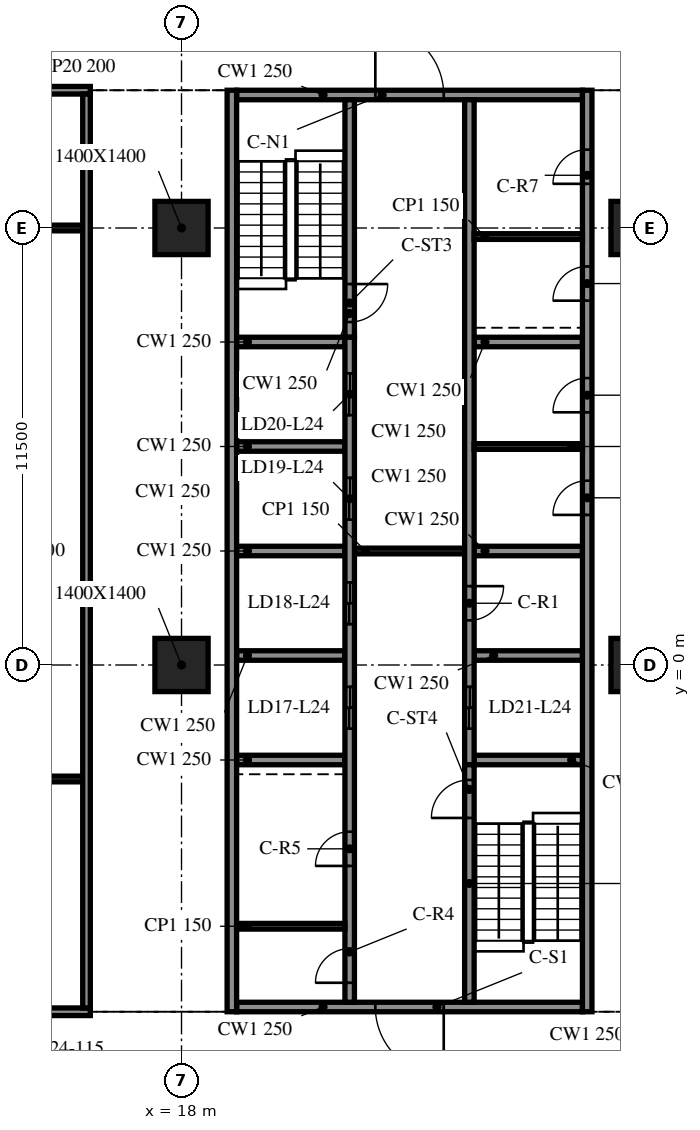
"""IFC4 building model, lengths in metres.
Left out: names, types, materials, properties, quantities, classifications, styles, units other than length and angle.
Written with IfcOpenShell. Run it as: python <this file> out.ifc"""

import sys

from ifc_helpers import new_model, si_unit, direction, frame, frame_2d, origin, origin_2d, place, context, subcontext, project, spatial, rectangle, extrude, element, fill, save


model = new_model("IFC4")
c1 = context("Model", 3, precision=1e-05, world=origin(), true_north=direction((0.0, 1.0)))
c2 = subcontext(c1, "Body", "Model", "MODEL_VIEW")
j1 = project(units=[si_unit("LENGTHUNIT", "METRE"), si_unit("PLANEANGLEUNIT", "RADIAN")], contexts=[c1])
p1 = place(None, origin())
s1 = spatial("IfcSite", under=j1, at=p1, CompositionType="ELEMENT")
p2 = place(p1, origin())
s2 = spatial("IfcBuilding", under=s1, at=p2, CompositionType="ELEMENT")
p3 = place(p2, frame((0.0, 0.0, 105.3)))
s3 = spatial("IfcBuildingStorey", under=s2, at=p3, CompositionType="ELEMENT", Elevation=105.3)
for number, where, z_axis, x_axis in (
    (1, (18.0, 0.0, -0.34), (0.0, 0.0, 1.0), (1.0, 0.0, 0.0)),
    (2, (18.0, 11.5, -0.34), (0.0, 0.0, 1.0), (1.0, 0.0, 0.0)),
    (3, (30.0, 0.0, -0.34), (0.0, 0.0, 1.0), (1.0, 0.0, 0.0)),
    (4, (30.0, 11.5, -0.34), (0.0, 0.0, 1.0), (1.0, 0.0, 0.0)),
):
    element("IfcColumn", number, at=place(p3, frame(where, z_axis=z_axis, x_axis=x_axis)), inside=s3, PredefinedType="COLUMN", context=c2, shape_type="SweptSolid", body=[
        extrude(rectangle(XDim=1.4, YDim=1.4, at=origin_2d()), origin(), (0.0, 0.0, 1.0), 4.1),
    ])
p4 = place(p3, frame((19.325, 15.125, 0.0), z_axis=(0.0, 0.0, 1.0), x_axis=(0.0, -1.0, 0.0)))
e5 = element("IfcWall", 5, at=p4, inside=s3, PredefinedType="SOLIDWALL", context=c2, shape_type="SweptSolid", body=[
    extrude(rectangle(XDim=24.25, YDim=0.25, at=frame_2d((12.125, 0.0))), origin(), (0.0, 0.0, 1.0), 3.76),
])
p5 = place(p3, frame((28.675, -9.125, 0.0), z_axis=(0.0, 0.0, 1.0), x_axis=(0.0, 1.0, 0.0)))
e6 = element("IfcWall", 6, at=p5, inside=s3, PredefinedType="SOLIDWALL", context=c2, shape_type="SweptSolid", body=[
    extrude(rectangle(XDim=24.25, YDim=0.25, at=frame_2d((12.125, 0.0))), origin(), (0.0, 0.0, 1.0), 3.76),
])
p6 = place(p5, frame((13.075, 0.0, 0.0)))
e7 = element("IfcOpeningElement", 7, at=p6, cuts=e6, PredefinedType="OPENING", context=c2, shape_type="SweptSolid", body=[
    extrude(rectangle(XDim=0.9, YDim=2.1, at=frame_2d((0.45, 1.05))), frame((0.0, 0.135, 0.0), z_axis=(0.0, -1.0, 0.0), x_axis=(1.0, 0.0, 0.0)), (0.0, 0.0, 1.0), 0.27),
])
p7 = place(p5, frame((15.775, 0.0, 0.0)))
e8 = element("IfcOpeningElement", 8, at=p7, cuts=e6, PredefinedType="OPENING", context=c2, shape_type="SweptSolid", body=[
    extrude(rectangle(XDim=0.9, YDim=2.1, at=frame_2d((0.45, 1.05))), frame((0.0, 0.135, 0.0), z_axis=(0.0, -1.0, 0.0), x_axis=(1.0, 0.0, 0.0)), (0.0, 0.0, 1.0), 0.27),
])
p8 = place(p5, frame((18.712, 0.0, 0.0)))
e9 = element("IfcOpeningElement", 9, at=p8, cuts=e6, PredefinedType="OPENING", context=c2, shape_type="SweptSolid", body=[
    extrude(rectangle(XDim=0.9, YDim=2.1, at=frame_2d((0.45, 1.05))), frame((0.0, 0.135, 0.0), z_axis=(0.0, -1.0, 0.0), x_axis=(1.0, 0.0, 0.0)), (0.0, 0.0, 1.0), 0.27),
])
p9 = place(p5, frame((21.788, 0.0, 0.0)))
e10 = element("IfcOpeningElement", 10, at=p9, cuts=e6, PredefinedType="OPENING", context=c2, shape_type="SweptSolid", body=[
    extrude(rectangle(XDim=0.9, YDim=2.1, at=frame_2d((0.45, 1.05))), frame((0.0, 0.135, 0.0), z_axis=(0.0, -1.0, 0.0), x_axis=(1.0, 0.0, 0.0)), (0.0, 0.0, 1.0), 0.27),
])
p10 = place(p3, frame((28.55, -9.0, 0.0), z_axis=(0.0, 0.0, 1.0), x_axis=(-1.0, 0.0, 0.0)))
e11 = element("IfcWall", 11, at=p10, inside=s3, PredefinedType="SOLIDWALL", context=c2, shape_type="SweptSolid", body=[
    extrude(rectangle(XDim=9.1, YDim=0.25, at=frame_2d((4.55, 0.0))), origin(), (0.0, 0.0, 1.0), 3.76),
])
p11 = place(p10, frame((3.65, 0.0, 0.0)))
e12 = element("IfcOpeningElement", 12, at=p11, cuts=e11, PredefinedType="OPENING", context=c2, shape_type="SweptSolid", body=[
    extrude(rectangle(XDim=1.8, YDim=2.1, at=frame_2d((0.9, 1.05))), frame((0.0, 0.135, 0.0), z_axis=(0.0, -1.0, 0.0), x_axis=(1.0, 0.0, 0.0)), (0.0, 0.0, 1.0), 0.27),
])
p12 = place(p3, frame((19.45, 15.0, 0.0), z_axis=(0.0, 0.0, 1.0), x_axis=(1.0, 0.0, 0.0)))
e13 = element("IfcWall", 13, at=p12, inside=s3, PredefinedType="SOLIDWALL", context=c2, shape_type="SweptSolid", body=[
    extrude(rectangle(XDim=9.1, YDim=0.25, at=frame_2d((4.55, 0.0))), origin(), (0.0, 0.0, 1.0), 3.76),
])
p13 = place(p12, frame((3.65, 0.0, 0.0)))
e14 = element("IfcOpeningElement", 14, at=p13, cuts=e13, PredefinedType="OPENING", context=c2, shape_type="SweptSolid", body=[
    extrude(rectangle(XDim=1.8, YDim=2.1, at=frame_2d((0.9, 1.05))), frame((0.0, 0.135, 0.0), z_axis=(0.0, -1.0, 0.0), x_axis=(1.0, 0.0, 0.0)), (0.0, 0.0, 1.0), 0.27),
])
p14 = place(p3, frame((22.425, -8.875, 0.0), z_axis=(0.0, 0.0, 1.0), x_axis=(0.0, 1.0, 0.0)))
e15 = element("IfcWall", 15, at=p14, inside=s3, PredefinedType="SOLIDWALL", context=c2, shape_type="SweptSolid", body=[
    extrude(rectangle(XDim=17.5, YDim=0.25, at=frame_2d((8.75, 0.0))), origin(), (0.0, 0.0, 1.0), 3.76),
])
p15 = place(p14, frame((7.2, 0.0, 0.0)))
e16 = element("IfcOpeningElement", 16, at=p15, cuts=e15, PredefinedType="OPENING", context=c2, shape_type="SweptSolid", body=[
    extrude(rectangle(XDim=1.1, YDim=2.1, at=frame_2d((0.55, 1.05))), frame((0.0, 0.135, 0.0), z_axis=(0.0, -1.0, 0.0), x_axis=(1.0, 0.0, 0.0)), (0.0, 0.0, 1.0), 0.27),
])
p16 = place(p14, frame((9.95, 0.0, 0.0)))
e17 = element("IfcOpeningElement", 17, at=p16, cuts=e15, PredefinedType="OPENING", context=c2, shape_type="SweptSolid", body=[
    extrude(rectangle(XDim=1.1, YDim=2.1, at=frame_2d((0.55, 1.05))), frame((0.0, 0.135, 0.0), z_axis=(0.0, -1.0, 0.0), x_axis=(1.0, 0.0, 0.0)), (0.0, 0.0, 1.0), 0.27),
])
p17 = place(p14, frame((12.7, 0.0, 0.0)))
e18 = element("IfcOpeningElement", 18, at=p17, cuts=e15, PredefinedType="OPENING", context=c2, shape_type="SweptSolid", body=[
    extrude(rectangle(XDim=1.1, YDim=2.1, at=frame_2d((0.55, 1.05))), frame((0.0, 0.135, 0.0), z_axis=(0.0, -1.0, 0.0), x_axis=(1.0, 0.0, 0.0)), (0.0, 0.0, 1.0), 0.27),
])
p18 = place(p14, frame((15.45, 0.0, 0.0)))
e19 = element("IfcOpeningElement", 19, at=p18, cuts=e15, PredefinedType="OPENING", context=c2, shape_type="SweptSolid", body=[
    extrude(rectangle(XDim=1.1, YDim=2.1, at=frame_2d((0.55, 1.05))), frame((0.0, 0.135, 0.0), z_axis=(0.0, -1.0, 0.0), x_axis=(1.0, 0.0, 0.0)), (0.0, 0.0, 1.0), 0.27),
])
p19 = place(p14, frame((0.512, 0.0, 0.0)))
e20 = element("IfcOpeningElement", 20, at=p19, cuts=e15, PredefinedType="OPENING", context=c2, shape_type="SweptSolid", body=[
    extrude(rectangle(XDim=0.9, YDim=2.1, at=frame_2d((0.45, 1.05))), frame((0.0, 0.135, 0.0), z_axis=(0.0, -1.0, 0.0), x_axis=(1.0, 0.0, 0.0)), (0.0, 0.0, 1.0), 0.27),
])
p20 = place(p14, frame((3.587, 0.0, 0.0)))
e21 = element("IfcOpeningElement", 21, at=p20, cuts=e15, PredefinedType="OPENING", context=c2, shape_type="SweptSolid", body=[
    extrude(rectangle(XDim=0.9, YDim=2.1, at=frame_2d((0.45, 1.05))), frame((0.0, 0.135, 0.0), z_axis=(0.0, -1.0, 0.0), x_axis=(1.0, 0.0, 0.0)), (0.0, 0.0, 1.0), 0.27),
])
p21 = place(p3, frame((22.425, 14.875, 0.0), z_axis=(0.0, 0.0, 1.0), x_axis=(0.0, -1.0, 0.0)))
e22 = element("IfcWall", 22, at=p21, inside=s3, PredefinedType="SOLIDWALL", context=c2, shape_type="SweptSolid", body=[
    extrude(rectangle(XDim=6.25, YDim=0.25, at=frame_2d((3.125, 0.0))), origin(), (0.0, 0.0, 1.0), 3.76),
])
p22 = place(p21, frame((4.85, 0.0, 0.0)))
e23 = element("IfcOpeningElement", 23, at=p22, cuts=e22, PredefinedType="OPENING", context=c2, shape_type="SweptSolid", body=[
    extrude(rectangle(XDim=1.0, YDim=2.1, at=frame_2d((0.5, 1.05))), frame((0.0, 0.135, 0.0), z_axis=(0.0, -1.0, 0.0), x_axis=(1.0, 0.0, 0.0)), (0.0, 0.0, 1.0), 0.27),
])
p23 = place(p3, frame((25.575, -8.875, 0.0), z_axis=(0.0, 0.0, 1.0), x_axis=(0.0, 1.0, 0.0)))
e24 = element("IfcWall", 24, at=p23, inside=s3, PredefinedType="SOLIDWALL", context=c2, shape_type="SweptSolid", body=[
    extrude(rectangle(XDim=6.25, YDim=0.25, at=frame_2d((3.125, 0.0))), origin(), (0.0, 0.0, 1.0), 3.76),
])
p24 = place(p23, frame((4.85, 0.0, 0.0)))
e25 = element("IfcOpeningElement", 25, at=p24, cuts=e24, PredefinedType="OPENING", context=c2, shape_type="SweptSolid", body=[
    extrude(rectangle(XDim=1.0, YDim=2.1, at=frame_2d((0.5, 1.05))), frame((0.0, 0.135, 0.0), z_axis=(0.0, -1.0, 0.0), x_axis=(1.0, 0.0, 0.0)), (0.0, 0.0, 1.0), 0.27),
])
p25 = place(p3, frame((25.575, 14.875, 0.0), z_axis=(0.0, 0.0, 1.0), x_axis=(0.0, -1.0, 0.0)))
e26 = element("IfcWall", 26, at=p25, inside=s3, PredefinedType="SOLIDWALL", context=c2, shape_type="SweptSolid", body=[
    extrude(rectangle(XDim=17.5, YDim=0.25, at=frame_2d((8.75, 0.0))), origin(), (0.0, 0.0, 1.0), 3.76),
])
p26 = place(p25, frame((15.45, 0.0, 0.0)))
e27 = element("IfcOpeningElement", 27, at=p26, cuts=e26, PredefinedType="OPENING", context=c2, shape_type="SweptSolid", body=[
    extrude(rectangle(XDim=1.1, YDim=2.1, at=frame_2d((0.55, 1.05))), frame((0.0, 0.135, 0.0), z_axis=(0.0, -1.0, 0.0), x_axis=(1.0, 0.0, 0.0)), (0.0, 0.0, 1.0), 0.27),
])
p27 = place(p25, frame((12.8, 0.0, 0.0)))
e28 = element("IfcOpeningElement", 28, at=p27, cuts=e26, PredefinedType="OPENING", context=c2, shape_type="SweptSolid", body=[
    extrude(rectangle(XDim=0.9, YDim=2.1, at=frame_2d((0.45, 1.05))), frame((0.0, 0.135, 0.0), z_axis=(0.0, -1.0, 0.0), x_axis=(1.0, 0.0, 0.0)), (0.0, 0.0, 1.0), 0.27),
])
for number, where, z_axis, x_axis in (
    (29, (19.45, -2.5, 0.0), (0.0, 0.0, 1.0), (1.0, 0.0, 0.0)),
    (30, (19.45, 0.25, 0.0), (0.0, 0.0, 1.0), (1.0, 0.0, 0.0)),
    (31, (19.45, 3.0, 0.0), (0.0, 0.0, 1.0), (1.0, 0.0, 0.0)),
    (32, (19.45, 5.75, 0.0), (0.0, 0.0, 1.0), (1.0, 0.0, 0.0)),
    (33, (19.45, 8.5, 0.0), (0.0, 0.0, 1.0), (1.0, 0.0, 0.0)),
    (34, (25.7, -2.5, 0.0), (0.0, 0.0, 1.0), (1.0, 0.0, 0.0)),
    (35, (25.7, 0.25, 0.0), (0.0, 0.0, 1.0), (1.0, 0.0, 0.0)),
    (36, (25.7, 3.0, 0.0), (0.0, 0.0, 1.0), (1.0, 0.0, 0.0)),
    (37, (25.7, 8.5, 0.0), (0.0, 0.0, 1.0), (1.0, 0.0, 0.0)),
):
    element("IfcWall", number, at=place(p3, frame(where, z_axis=z_axis, x_axis=x_axis)), inside=s3, PredefinedType="SOLIDWALL", context=c2, shape_type="SweptSolid", body=[
        extrude(rectangle(XDim=2.85, YDim=0.25, at=frame_2d((1.425, 0.0))), origin(), (0.0, 0.0, 1.0), 3.76),
    ])
p28 = place(p3, frame((22.55, 3.0, 0.0), z_axis=(0.0, 0.0, 1.0), x_axis=(1.0, 0.0, 0.0)))
e38 = element("IfcWall", 38, at=p28, inside=s3, PredefinedType="PARTITIONING", context=c2, shape_type="SweptSolid", body=[
    extrude(rectangle(XDim=2.9, YDim=0.15, at=frame_2d((1.45, 0.0))), origin(), (0.0, 0.0, 1.0), 3.76),
])
for number, where, z_axis, x_axis in (
    (39, (25.7, 5.75, 0.0), (0.0, 0.0, 1.0), (1.0, 0.0, 0.0)),
    (40, (19.45, -6.875, 0.0), (0.0, 0.0, 1.0), (1.0, 0.0, 0.0)),
    (41, (25.7, 11.275, 0.0), (0.0, 0.0, 1.0), (1.0, 0.0, 0.0)),
):
    element("IfcWall", number, at=place(p3, frame(where, z_axis=z_axis, x_axis=x_axis)), inside=s3, PredefinedType="PARTITIONING", context=c2, shape_type="SweptSolid", body=[
        extrude(rectangle(XDim=2.85, YDim=0.15, at=frame_2d((1.425, 0.0))), origin(), (0.0, 0.0, 1.0), 3.76),
    ])
p29 = place(p3, frame((8.3, -9.125, 0.0), z_axis=(0.0, 0.0, 1.0), x_axis=(1.0, 0.0, 0.0)))
e42 = element("IfcWall", 42, at=p29, inside=s3, PredefinedType="PARTITIONING", context=c2, shape_type="SweptSolid", body=[
    extrude(rectangle(XDim=7.3, YDim=0.2, at=frame_2d((3.65, 0.0))), origin(), (0.0, 0.0, 1.0), 3.76),
])
p30 = place(p29, frame((3.1, 0.0, 0.0)))
e43 = element("IfcOpeningElement", 43, at=p30, cuts=e42, PredefinedType="OPENING", context=c2, shape_type="SweptSolid", body=[
    extrude(rectangle(XDim=1.2, YDim=2.1, at=frame_2d((0.6, 1.05))), frame((0.0, 0.11, 0.0), z_axis=(0.0, -1.0, 0.0), x_axis=(1.0, 0.0, 0.0)), (0.0, 0.0, 1.0), 0.22),
])
for number, where, z_axis, x_axis in (
    (44, (8.5, -3.0, 0.0), (0.0, 0.0, 1.0), (1.0, 0.0, 0.0)),
    (45, (8.5, 11.5, 0.0), (0.0, 0.0, 1.0), (1.0, 0.0, 0.0)),
):
    element("IfcWall", number, at=place(p3, frame(where, z_axis=z_axis, x_axis=x_axis)), inside=s3, PredefinedType="PARTITIONING", context=c2, shape_type="SweptSolid", body=[
        extrude(rectangle(XDim=6.9, YDim=0.15, at=frame_2d((3.45, 0.0))), origin(), (0.0, 0.0, 1.0), 3.76),
    ])
p31 = place(p3, frame((8.3, 15.125, 0.0), z_axis=(0.0, 0.0, 1.0), x_axis=(1.0, 0.0, 0.0)))
e46 = element("IfcWall", 46, at=p31, inside=s3, PredefinedType="PARTITIONING", context=c2, shape_type="SweptSolid", body=[
    extrude(rectangle(XDim=7.3, YDim=0.2, at=frame_2d((3.65, 0.0))), origin(), (0.0, 0.0, 1.0), 3.76),
])
p32 = place(p31, frame((3.1, 0.0, 0.0)))
e47 = element("IfcOpeningElement", 47, at=p32, cuts=e46, PredefinedType="OPENING", context=c2, shape_type="SweptSolid", body=[
    extrude(rectangle(XDim=1.0, YDim=2.1, at=frame_2d((0.5, 1.05))), frame((0.0, 0.11, 0.0), z_axis=(0.0, -1.0, 0.0), x_axis=(1.0, 0.0, 0.0)), (0.0, 0.0, 1.0), 0.22),
])
p33 = place(p3, frame((15.5, -9.025, 0.0), z_axis=(0.0, 0.0, 1.0), x_axis=(0.0, 1.0, 0.0)))
e48 = element("IfcWall", 48, at=p33, inside=s3, PredefinedType="PARTITIONING", context=c2, shape_type="SweptSolid", body=[
    extrude(rectangle(XDim=24.05, YDim=0.2, at=frame_2d((12.025, 0.0))), origin(), (0.0, 0.0, 1.0), 3.76),
])
p34 = place(p11, origin())
e49 = element("IfcDoor", 49, at=p34, inside=s3, OperationType="DOUBLE_DOOR_SINGLE_SWING", PredefinedType="DOOR", context=c2, shape_type="SweptSolid", body=[
    extrude(rectangle(XDim=1.8, YDim=2.1, at=frame_2d((0.9, 1.05))), frame((0.0, 0.025, 0.0), z_axis=(0.0, -1.0, 0.0), x_axis=(1.0, 0.0, 0.0)), (0.0, 0.0, 1.0), 0.05),
])
fill(e12, e49)
p35 = place(p13, origin())
e50 = element("IfcDoor", 50, at=p35, inside=s3, OperationType="DOUBLE_DOOR_SINGLE_SWING", PredefinedType="DOOR", context=c2, shape_type="SweptSolid", body=[
    extrude(rectangle(XDim=1.8, YDim=2.1, at=frame_2d((0.9, 1.05))), frame((0.0, 0.025, 0.0), z_axis=(0.0, -1.0, 0.0), x_axis=(1.0, 0.0, 0.0)), (0.0, 0.0, 1.0), 0.05),
])
fill(e14, e50)
p36 = place(p26, origin())
e51 = element("IfcDoor", 51, at=p36, inside=s3, OperationType="DOUBLE_DOOR_SLIDING", PredefinedType="DOOR", context=c2, shape_type="SweptSolid", body=[
    extrude(rectangle(XDim=1.1, YDim=2.1, at=frame_2d((0.55, 1.05))), frame((0.0, 0.025, 0.0), z_axis=(0.0, -1.0, 0.0), x_axis=(1.0, 0.0, 0.0)), (0.0, 0.0, 1.0), 0.05),
])
fill(e27, e51)
p37 = place(p15, origin())
e52 = element("IfcDoor", 52, at=p37, inside=s3, OperationType="DOUBLE_DOOR_SLIDING", PredefinedType="DOOR", context=c2, shape_type="SweptSolid", body=[
    extrude(rectangle(XDim=1.1, YDim=2.1, at=frame_2d((0.55, 1.05))), frame((0.0, 0.025, 0.0), z_axis=(0.0, -1.0, 0.0), x_axis=(1.0, 0.0, 0.0)), (0.0, 0.0, 1.0), 0.05),
])
fill(e16, e52)
p38 = place(p16, origin())
e53 = element("IfcDoor", 53, at=p38, inside=s3, OperationType="DOUBLE_DOOR_SLIDING", PredefinedType="DOOR", context=c2, shape_type="SweptSolid", body=[
    extrude(rectangle(XDim=1.1, YDim=2.1, at=frame_2d((0.55, 1.05))), frame((0.0, 0.025, 0.0), z_axis=(0.0, -1.0, 0.0), x_axis=(1.0, 0.0, 0.0)), (0.0, 0.0, 1.0), 0.05),
])
fill(e17, e53)
p39 = place(p17, origin())
e54 = element("IfcDoor", 54, at=p39, inside=s3, OperationType="DOUBLE_DOOR_SLIDING", PredefinedType="DOOR", context=c2, shape_type="SweptSolid", body=[
    extrude(rectangle(XDim=1.1, YDim=2.1, at=frame_2d((0.55, 1.05))), frame((0.0, 0.025, 0.0), z_axis=(0.0, -1.0, 0.0), x_axis=(1.0, 0.0, 0.0)), (0.0, 0.0, 1.0), 0.05),
])
fill(e18, e54)
p40 = place(p18, origin())
e55 = element("IfcDoor", 55, at=p40, inside=s3, OperationType="DOUBLE_DOOR_SLIDING", PredefinedType="DOOR", context=c2, shape_type="SweptSolid", body=[
    extrude(rectangle(XDim=1.1, YDim=2.1, at=frame_2d((0.55, 1.05))), frame((0.0, 0.025, 0.0), z_axis=(0.0, -1.0, 0.0), x_axis=(1.0, 0.0, 0.0)), (0.0, 0.0, 1.0), 0.05),
])
fill(e19, e55)
p41 = place(p27, origin())
e56 = element("IfcDoor", 56, at=p41, inside=s3, OperationType="SINGLE_SWING_LEFT", PredefinedType="DOOR", context=c2, shape_type="SweptSolid", body=[
    extrude(rectangle(XDim=0.9, YDim=2.1, at=frame_2d((0.45, 1.05))), frame((0.0, 0.025, 0.0), z_axis=(0.0, -1.0, 0.0), x_axis=(1.0, 0.0, 0.0)), (0.0, 0.0, 1.0), 0.05),
])
fill(e28, e56)
p42 = place(p6, origin())
e57 = element("IfcDoor", 57, at=p42, inside=s3, OperationType="SINGLE_SWING_RIGHT", PredefinedType="DOOR", context=c2, shape_type="SweptSolid", body=[
    extrude(rectangle(XDim=0.9, YDim=2.1, at=frame_2d((0.45, 1.05))), frame((0.0, 0.025, 0.0), z_axis=(0.0, -1.0, 0.0), x_axis=(1.0, 0.0, 0.0)), (0.0, 0.0, 1.0), 0.05),
])
fill(e7, e57)
p43 = place(p7, origin())
e58 = element("IfcDoor", 58, at=p43, inside=s3, OperationType="SINGLE_SWING_LEFT", PredefinedType="DOOR", context=c2, shape_type="SweptSolid", body=[
    extrude(rectangle(XDim=0.9, YDim=2.1, at=frame_2d((0.45, 1.05))), frame((0.0, 0.025, 0.0), z_axis=(0.0, -1.0, 0.0), x_axis=(1.0, 0.0, 0.0)), (0.0, 0.0, 1.0), 0.05),
])
fill(e8, e58)
p44 = place(p19, origin())
e59 = element("IfcDoor", 59, at=p44, inside=s3, OperationType="SINGLE_SWING_RIGHT", PredefinedType="DOOR", context=c2, shape_type="SweptSolid", body=[
    extrude(rectangle(XDim=0.9, YDim=2.1, at=frame_2d((0.45, 1.05))), frame((0.0, 0.025, 0.0), z_axis=(0.0, -1.0, 0.0), x_axis=(1.0, 0.0, 0.0)), (0.0, 0.0, 1.0), 0.05),
])
fill(e20, e59)
p45 = place(p20, origin())
e60 = element("IfcDoor", 60, at=p45, inside=s3, OperationType="SINGLE_SWING_LEFT", PredefinedType="DOOR", context=c2, shape_type="SweptSolid", body=[
    extrude(rectangle(XDim=0.9, YDim=2.1, at=frame_2d((0.45, 1.05))), frame((0.0, 0.025, 0.0), z_axis=(0.0, -1.0, 0.0), x_axis=(1.0, 0.0, 0.0)), (0.0, 0.0, 1.0), 0.05),
])
fill(e21, e60)
p46 = place(p8, origin())
e61 = element("IfcDoor", 61, at=p46, inside=s3, OperationType="SINGLE_SWING_RIGHT", PredefinedType="DOOR", context=c2, shape_type="SweptSolid", body=[
    extrude(rectangle(XDim=0.9, YDim=2.1, at=frame_2d((0.45, 1.05))), frame((0.0, 0.025, 0.0), z_axis=(0.0, -1.0, 0.0), x_axis=(1.0, 0.0, 0.0)), (0.0, 0.0, 1.0), 0.05),
])
fill(e9, e61)
p47 = place(p9, origin())
e62 = element("IfcDoor", 62, at=p47, inside=s3, OperationType="SINGLE_SWING_LEFT", PredefinedType="DOOR", context=c2, shape_type="SweptSolid", body=[
    extrude(rectangle(XDim=0.9, YDim=2.1, at=frame_2d((0.45, 1.05))), frame((0.0, 0.025, 0.0), z_axis=(0.0, -1.0, 0.0), x_axis=(1.0, 0.0, 0.0)), (0.0, 0.0, 1.0), 0.05),
])
fill(e10, e62)
p48 = place(p22, origin())
e63 = element("IfcDoor", 63, at=p48, inside=s3, OperationType="SINGLE_SWING_RIGHT", PredefinedType="DOOR", context=c2, shape_type="SweptSolid", body=[
    extrude(rectangle(XDim=1.0, YDim=2.1, at=frame_2d((0.5, 1.05))), frame((0.0, 0.025, 0.0), z_axis=(0.0, -1.0, 0.0), x_axis=(1.0, 0.0, 0.0)), (0.0, 0.0, 1.0), 0.05),
])
fill(e23, e63)
p49 = place(p24, origin())
e64 = element("IfcDoor", 64, at=p49, inside=s3, OperationType="SINGLE_SWING_LEFT", PredefinedType="DOOR", context=c2, shape_type="SweptSolid", body=[
    extrude(rectangle(XDim=1.0, YDim=2.1, at=frame_2d((0.5, 1.05))), frame((0.0, 0.025, 0.0), z_axis=(0.0, -1.0, 0.0), x_axis=(1.0, 0.0, 0.0)), (0.0, 0.0, 1.0), 0.05),
])
fill(e25, e64)
save(model, sys.argv[1])
